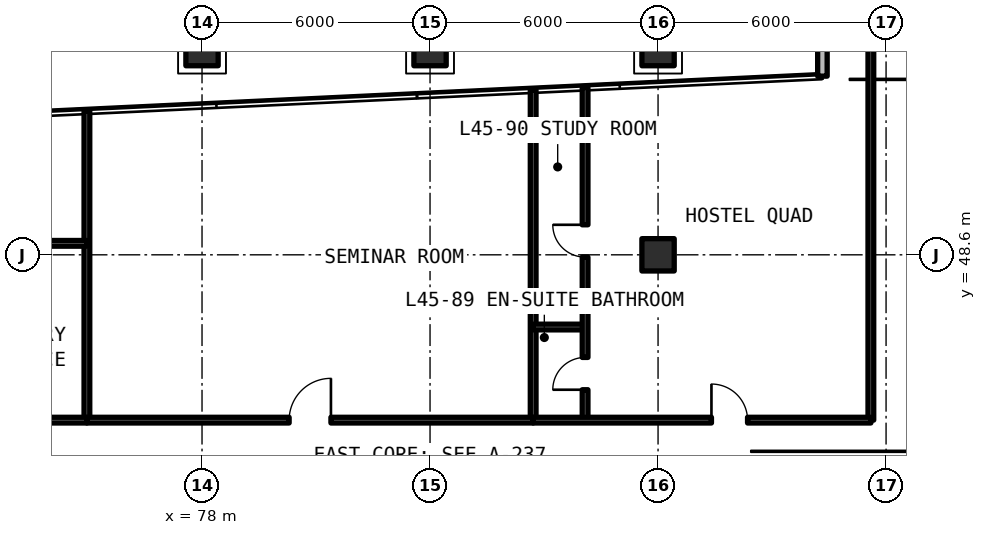
"""IFC4 building model, lengths in metres.
Left out: names, types, materials, properties, quantities, classifications, styles, units other than length and angle.
Written with IfcOpenShell. Run it as: python <this file> out.ifc"""

import sys

from ifc_helpers import new_model, si_unit, direction, frame, frame_2d, origin, origin_2d, place, context, subcontext, project, spatial, rectangle, extrude, element, fill, save


model = new_model("IFC4")
c1 = context("Model", 3, precision=1e-05, world=origin(), true_north=direction((0.0, 1.0)))
c2 = subcontext(c1, "Body", "Model", "MODEL_VIEW")
j1 = project(units=[si_unit("LENGTHUNIT", "METRE"), si_unit("PLANEANGLEUNIT", "RADIAN")], contexts=[c1])
p1 = place(None, origin())
s1 = spatial("IfcSite", under=j1, at=p1, CompositionType="ELEMENT")
p2 = place(p1, origin())
s2 = spatial("IfcBuilding", under=s1, at=p2, CompositionType="ELEMENT")
p3 = place(p2, frame((0.0, 0.0, 162.03)))
s3 = spatial("IfcBuildingStorey", under=s2, at=p3, CompositionType="ELEMENT", Elevation=162.03)
for number, where, z_axis, x_axis in (
    (1, (90.0, 48.6, 0.0), (0.0, 0.0, 1.0), (1.0, 0.0, 0.0)),
    (2, (78.0, 54.0, 0.0), (0.0, 0.0, 1.0), (1.0, 0.0, 0.0)),
    (3, (84.0, 54.0, 0.0), (0.0, 0.0, 1.0), (1.0, 0.0, 0.0)),
    (4, (90.0, 54.0, 0.0), (0.0, 0.0, 1.0), (1.0, 0.0, 0.0)),
):
    element("IfcColumn", number, at=place(p3, frame(where, z_axis=z_axis, x_axis=x_axis)), inside=s3, PredefinedType="COLUMN", context=c2, shape_type="SweptSolid", body=[
        extrude(rectangle(XDim=0.85, YDim=0.85, at=origin_2d()), origin(), (0.0, 0.0, 1.0), 3.63),
    ])
p4 = place(p3, frame((99.875, 51.048, 0.0), z_axis=(0.0, 0.0, 1.0), x_axis=(-0.70708586489, 0.707127696864, 0.0)))
e5 = element("IfcWall", 5, at=p4, inside=s3, PredefinedType="SOLIDWALL", context=c2, shape_type="SweptSolid", body=[
    extrude(rectangle(XDim=5.836, YDim=0.25, at=frame_2d((2.918, 0.0))), origin(), (0.0, 0.0, 1.0), 3.41),
])
p5 = place(p4, frame((1.218, 0.0, 0.78)))
e6 = element("IfcOpeningElement", 6, at=p5, cuts=e5, PredefinedType="OPENING", context=c2, shape_type="SweptSolid", body=[
    extrude(rectangle(XDim=3.4, YDim=1.66, at=frame_2d((1.7, 0.83))), frame((0.0, 0.135, 0.0), z_axis=(0.0, -1.0, 0.0), x_axis=(1.0, 0.0, 0.0)), (0.0, 0.0, 1.0), 0.27),
])
p6 = place(p3, frame((94.325, 55.175, 0.0), z_axis=(0.0, 0.0, 1.0), x_axis=(0.0, -1.0, 0.0)))
e7 = element("IfcWall", 7, at=p6, inside=s3, PredefinedType="SOLIDWALL", context=c2, shape_type="SweptSolid", body=[
    extrude(rectangle(XDim=1.874, YDim=0.25, at=frame_2d((0.937, 0.0))), origin(), (0.0, 0.0, 1.0), 3.41),
])
p7 = place(p3, frame((95.6, 44.25, 0.0), z_axis=(0.0, 0.0, 1.0), x_axis=(0.0, 1.0, 0.0)))
e8 = element("IfcWall", 8, at=p7, inside=s3, PredefinedType="SOLIDWALL", context=c2, shape_type="SweptSolid", body=[
    extrude(rectangle(XDim=10.925, YDim=0.15, at=frame_2d((5.462, 0.0))), origin(), (0.0, 0.0, 1.0), 2.63),
])
p8 = place(p3, frame((74.971, 44.25, 0.0), z_axis=(0.0, 0.0, 1.0), x_axis=(0.0, 1.0, 0.0)))
e9 = element("IfcWall", 9, at=p8, inside=s3, PredefinedType="SOLIDWALL", context=c2, shape_type="SweptSolid", body=[
    extrude(rectangle(XDim=8.134, YDim=0.15, at=frame_2d((4.067, 0.0))), origin(), (0.0, 0.0, 1.0), 2.63),
])
p9 = place(p3, frame((66.084, 48.902, 0.0), z_axis=(0.0, 0.0, 1.0), x_axis=(1.0, 0.0, 0.0)))
e10 = element("IfcWall", 10, at=p9, inside=s3, PredefinedType="PARTITIONING", context=c2, shape_type="SweptSolid", body=[
    extrude(rectangle(XDim=8.886, YDim=0.15, at=frame_2d((4.443, 0.0))), origin(), (0.0, 0.0, 1.0), 2.63),
])
p10 = place(p9, frame((5.233, 0.0, 0.0)))
e11 = element("IfcOpeningElement", 11, at=p10, cuts=e10, PredefinedType="OPENING", context=c2, shape_type="SweptSolid", body=[
    extrude(rectangle(XDim=0.85, YDim=2.1, at=frame_2d((0.425, 1.05))), frame((0.0, 0.085, 0.0), z_axis=(0.0, -1.0, 0.0), x_axis=(1.0, 0.0, 0.0)), (0.0, 0.0, 1.0), 0.17),
])
p11 = place(p3, frame((66.084, 44.25, 0.0), z_axis=(0.0, 0.0, 1.0), x_axis=(1.0, 0.0, 0.0)))
e12 = element("IfcWall", 12, at=p11, inside=s3, PredefinedType="SOLIDWALL", context=c2, shape_type="SweptSolid", body=[
    extrude(rectangle(XDim=8.886, YDim=0.15, at=frame_2d((4.443, 0.0))), origin(), (0.0, 0.0, 1.0), 2.63),
])
p12 = place(p11, frame((4.133, 0.0, 0.0)))
e13 = element("IfcOpeningElement", 13, at=p12, cuts=e12, PredefinedType="OPENING", context=c2, shape_type="SweptSolid", body=[
    extrude(rectangle(XDim=0.95, YDim=2.15, at=frame_2d((0.475, 1.075))), frame((0.0, 0.085, 0.0), z_axis=(0.0, -1.0, 0.0), x_axis=(1.0, 0.0, 0.0)), (0.0, 0.0, 1.0), 0.17),
])
p13 = place(p3, frame((86.714, 44.25, 0.0), z_axis=(0.0, 0.0, 1.0), x_axis=(0.0, 1.0, 0.0)))
e14 = element("IfcWall", 14, at=p13, inside=s3, PredefinedType="SOLIDWALL", context=c2, shape_type="SweptSolid", body=[
    extrude(rectangle(XDim=8.69, YDim=0.15, at=frame_2d((4.345, 0.0))), origin(), (0.0, 0.0, 1.0), 2.63),
])
p14 = place(p3, frame((74.971, 44.25, 0.0), z_axis=(0.0, 0.0, 1.0), x_axis=(1.0, 0.0, 0.0)))
e15 = element("IfcWall", 15, at=p14, inside=s3, PredefinedType="SOLIDWALL", context=c2, shape_type="SweptSolid", body=[
    extrude(rectangle(XDim=11.743, YDim=0.15, at=frame_2d((5.872, 0.0))), origin(), (0.0, 0.0, 1.0), 2.63),
])
p15 = place(p14, frame((5.321, 0.0, 0.0)))
e16 = element("IfcOpeningElement", 16, at=p15, cuts=e15, PredefinedType="OPENING", context=c2, shape_type="SweptSolid", body=[
    extrude(rectangle(XDim=1.1, YDim=2.15, at=frame_2d((0.55, 1.075))), frame((0.0, 0.085, 0.0), z_axis=(0.0, -1.0, 0.0), x_axis=(1.0, 0.0, 0.0)), (0.0, 0.0, 1.0), 0.17),
])
p16 = place(p3, frame((86.714, 46.7, 0.0), z_axis=(0.0, 0.0, 1.0), x_axis=(1.0, 0.0, 0.0)))
e17 = element("IfcWall", 17, at=p16, inside=s3, PredefinedType="PARTITIONING", context=c2, shape_type="SweptSolid", body=[
    extrude(rectangle(XDim=1.366, YDim=0.15, at=frame_2d((0.683, 0.0))), origin(), (0.0, 0.0, 1.0), 2.63),
])
p17 = place(p3, frame((88.08, 44.25, 0.0), z_axis=(0.0, 0.0, 1.0), x_axis=(0.0, 1.0, 0.0)))
e18 = element("IfcWall", 18, at=p17, inside=s3, PredefinedType="PARTITIONING", context=c2, shape_type="SweptSolid", body=[
    extrude(rectangle(XDim=8.755, YDim=0.15, at=frame_2d((4.377, 0.0))), origin(), (0.0, 0.0, 1.0), 2.63),
])
p18 = place(p17, frame((0.8, 0.0, 0.0)))
e19 = element("IfcOpeningElement", 19, at=p18, cuts=e18, PredefinedType="OPENING", context=c2, shape_type="SweptSolid", body=[
    extrude(rectangle(XDim=0.85, YDim=2.1, at=frame_2d((0.425, 1.05))), frame((0.0, 0.085, 0.0), z_axis=(0.0, -1.0, 0.0), x_axis=(1.0, 0.0, 0.0)), (0.0, 0.0, 1.0), 0.17),
])
p19 = place(p17, frame((4.29, 0.0, 0.0)))
e20 = element("IfcOpeningElement", 20, at=p19, cuts=e18, PredefinedType="OPENING", context=c2, shape_type="SweptSolid", body=[
    extrude(rectangle(XDim=0.85, YDim=2.1, at=frame_2d((0.425, 1.05))), frame((0.0, 0.085, 0.0), z_axis=(0.0, -1.0, 0.0), x_axis=(1.0, 0.0, 0.0)), (0.0, 0.0, 1.0), 0.17),
])
p20 = place(p3, frame((86.714, 44.25, 0.0), z_axis=(0.0, 0.0, 1.0), x_axis=(1.0, 0.0, 0.0)))
e21 = element("IfcWall", 21, at=p20, inside=s3, PredefinedType="SOLIDWALL", context=c2, shape_type="SweptSolid", body=[
    extrude(rectangle(XDim=8.886, YDim=0.15, at=frame_2d((4.443, 0.0))), origin(), (0.0, 0.0, 1.0), 2.63),
])
p21 = place(p20, frame((4.691, 0.0, 0.0)))
e22 = element("IfcOpeningElement", 22, at=p21, cuts=e21, PredefinedType="OPENING", context=c2, shape_type="SweptSolid", body=[
    extrude(rectangle(XDim=0.95, YDim=2.15, at=frame_2d((0.475, 1.075))), frame((0.0, 0.085, 0.0), z_axis=(0.0, -1.0, 0.0), x_axis=(1.0, 0.0, 0.0)), (0.0, 0.0, 1.0), 0.17),
])
p22 = place(p15, origin())
e23 = element("IfcDoor", 23, at=p22, inside=s3, OperationType="SINGLE_SWING_RIGHT", PredefinedType="DOOR", context=c2, shape_type="SweptSolid", body=[
    extrude(rectangle(XDim=1.1, YDim=2.15, at=frame_2d((0.55, 1.075))), frame((0.0, 0.025, 0.0), z_axis=(0.0, -1.0, 0.0), x_axis=(1.0, 0.0, 0.0)), (0.0, 0.0, 1.0), 0.05),
])
fill(e16, e23)
p23 = place(p18, origin())
e24 = element("IfcDoor", 24, at=p23, inside=s3, OperationType="SINGLE_SWING_LEFT", PredefinedType="DOOR", context=c2, shape_type="SweptSolid", body=[
    extrude(rectangle(XDim=0.85, YDim=2.1, at=frame_2d((0.425, 1.05))), frame((0.0, 0.025, 0.0), z_axis=(0.0, -1.0, 0.0), x_axis=(1.0, 0.0, 0.0)), (0.0, 0.0, 1.0), 0.05),
])
fill(e19, e24)
p24 = place(p19, origin())
e25 = element("IfcDoor", 25, at=p24, inside=s3, OperationType="SINGLE_SWING_RIGHT", PredefinedType="DOOR", context=c2, shape_type="SweptSolid", body=[
    extrude(rectangle(XDim=0.85, YDim=2.1, at=frame_2d((0.425, 1.05))), frame((0.0, 0.025, 0.0), z_axis=(0.0, -1.0, 0.0), x_axis=(1.0, 0.0, 0.0)), (0.0, 0.0, 1.0), 0.05),
])
fill(e20, e25)
p25 = place(p21, origin())
e26 = element("IfcDoor", 26, at=p25, inside=s3, OperationType="SINGLE_SWING_LEFT", PredefinedType="DOOR", context=c2, shape_type="SweptSolid", body=[
    extrude(rectangle(XDim=0.95, YDim=2.15, at=frame_2d((0.475, 1.075))), frame((0.0, 0.025, 0.0), z_axis=(0.0, -1.0, 0.0), x_axis=(1.0, 0.0, 0.0)), (0.0, 0.0, 1.0), 0.05),
])
fill(e22, e26)
save(model, sys.argv[1])
